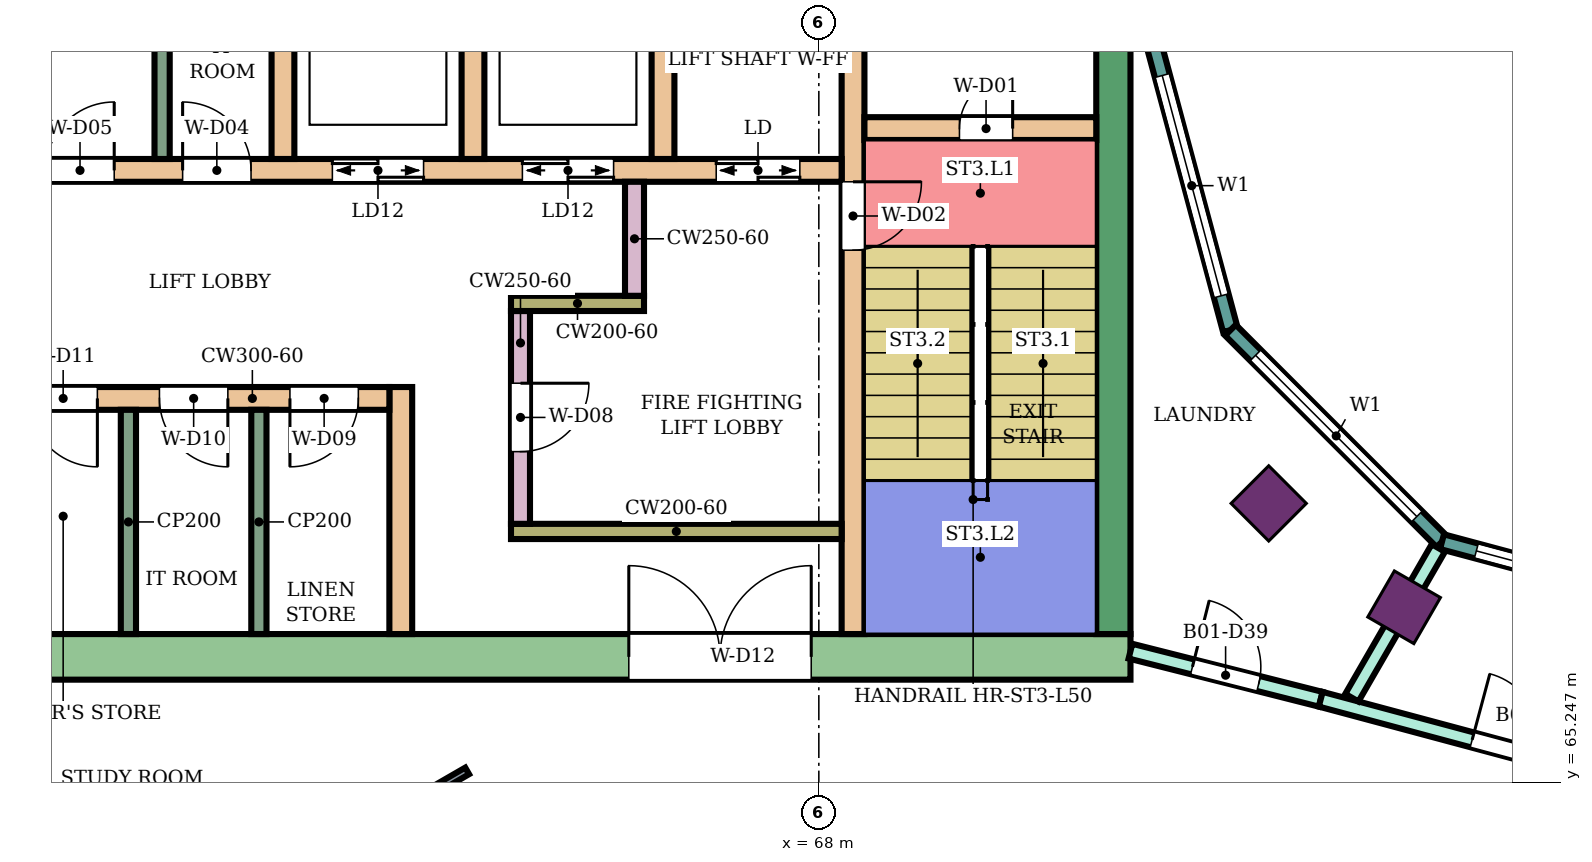
"""IFC4 building model, lengths in metres.
Left out: names, types, materials, properties, quantities, classifications, styles, units other than length and angle.
Written with IfcOpenShell. Run it as: python <this file> out.ifc"""

import sys

from ifc_helpers import new_model, si_unit, direction, frame, frame_2d, origin, origin_2d, place, context, subcontext, project, spatial, rectangle, extrude, element, fill, save


model = new_model("IFC4")
c1 = context("Model", 3, precision=1e-05, world=origin(), true_north=direction((0.0, 1.0)))
c2 = subcontext(c1, "Body", "Model", "MODEL_VIEW")
j1 = project(units=[si_unit("LENGTHUNIT", "METRE"), si_unit("PLANEANGLEUNIT", "RADIAN")], contexts=[c1])
p1 = place(None, origin())
s1 = spatial("IfcSite", under=j1, at=p1, CompositionType="ELEMENT")
p2 = place(p1, origin())
s2 = spatial("IfcBuilding", under=s1, at=p2, CompositionType="ELEMENT")
p3 = place(p2, frame((0.0, 0.0, 216.7)))
s3 = spatial("IfcBuildingStorey", under=s2, at=p3, CompositionType="ELEMENT", Elevation=216.7)
for number, where, z_axis, x_axis in (
    (1, (73.919, 68.919, 0.0), (0.0, 0.0, 1.0), (-0.707, -0.707, 0.0)),
    (2, (75.7, 67.552, 0.0), (0.0, 0.0, 1.0), (-0.5, -0.866, 0.0)),
):
    element("IfcColumn", number, at=place(p3, frame(where, z_axis=z_axis, x_axis=x_axis)), inside=s3, PredefinedType="COLUMN", context=c2, shape_type="SweptSolid", body=[
        extrude(rectangle(XDim=0.7, YDim=0.7, at=origin_2d()), origin(), (0.0, 0.0, 1.0), 4.2),
    ])
p4 = place(p3, frame((72.1, 66.9, 0.0), z_axis=(0.0, 0.0, 1.0), x_axis=(-1.0, 0.0, 0.0)))
e3 = element("IfcWall", 3, at=p4, inside=s3, PredefinedType="SHEAR", context=c2, shape_type="SweptSolid", body=[
    extrude(rectangle(XDim=14.9, YDim=0.6, at=frame_2d((7.45, 0.0))), origin(), (0.0, 0.0, 1.0), 3.88),
])
p5 = place(p4, frame((4.2, 0.0, 0.0)))
e4 = element("IfcOpeningElement", 4, at=p5, cuts=e3, PredefinedType="OPENING", context=c2, shape_type="SweptSolid", body=[
    extrude(rectangle(XDim=2.4, YDim=2.4, at=frame_2d((1.2, 1.2))), frame((0.0, 0.31, 0.0), z_axis=(0.0, -1.0, 0.0), x_axis=(1.0, 0.0, 0.0)), (0.0, 0.0, 1.0), 0.62),
])
p6 = place(p3, frame((71.875, 75.0, 0.0), z_axis=(0.0, 0.0, 1.0), x_axis=(0.0, -1.0, 0.0)))
e5 = element("IfcWall", 5, at=p6, inside=s3, PredefinedType="SHEAR", context=c2, shape_type="SweptSolid", body=[
    extrude(rectangle(XDim=7.8, YDim=0.45, at=frame_2d((3.9, 0.0))), origin(), (0.0, 0.0, 1.0), 3.88),
])
p7 = place(p3, frame((68.45, 75.0, 0.0), z_axis=(0.0, 0.0, 1.0), x_axis=(0.0, -1.0, 0.0)))
e6 = element("IfcWall", 6, at=p7, inside=s3, PredefinedType="SHEAR", context=c2, shape_type="SweptSolid", body=[
    extrude(rectangle(XDim=7.8, YDim=0.3, at=frame_2d((3.9, 0.0))), origin(), (0.0, 0.0, 1.0), 3.88),
])
p8 = place(p7, frame((1.85, 0.0, 0.0)))
e7 = element("IfcOpeningElement", 7, at=p8, cuts=e6, PredefinedType="OPENING", context=c2, shape_type="SweptSolid", body=[
    extrude(rectangle(XDim=0.9, YDim=2.1, at=frame_2d((0.45, 1.05))), frame((0.0, 0.16, 0.0), z_axis=(0.0, -1.0, 0.0), x_axis=(1.0, 0.0, 0.0)), (0.0, 0.0, 1.0), 0.32),
])
p9 = place(p3, frame((71.65, 73.85, 0.0), z_axis=(0.0, 0.0, 1.0), x_axis=(-1.0, 0.0, 0.0)))
e8 = element("IfcWall", 8, at=p9, inside=s3, PredefinedType="SHEAR", context=c2, shape_type="SweptSolid", body=[
    extrude(rectangle(XDim=3.05, YDim=0.3, at=frame_2d((1.525, 0.0))), origin(), (0.0, 0.0, 1.0), 3.88),
])
p10 = place(p9, frame((1.1, 0.0, 0.0)))
e9 = element("IfcOpeningElement", 9, at=p10, cuts=e8, PredefinedType="OPENING", context=c2, shape_type="SweptSolid", body=[
    extrude(rectangle(XDim=0.7, YDim=2.0, at=frame_2d((0.35, 1.0))), frame((0.0, 0.16, 0.0), z_axis=(0.0, -1.0, 0.0), x_axis=(1.0, 0.0, 0.0)), (0.0, 0.0, 1.0), 0.32),
])
p11 = place(p3, frame((68.3, 73.3, 0.0), z_axis=(0.0, 0.0, 1.0), x_axis=(-1.0, 0.0, 0.0)))
e10 = element("IfcWall", 10, at=p11, inside=s3, PredefinedType="SHEAR", context=c2, shape_type="SweptSolid", body=[
    extrude(rectangle(XDim=11.1, YDim=0.3, at=frame_2d((5.55, 0.0))), origin(), (0.0, 0.0, 1.0), 3.88),
])
p12 = place(p11, frame((0.55, 0.0, 0.0)))
e11 = element("IfcOpeningElement", 11, at=p12, cuts=e10, PredefinedType="OPENING", context=c2, shape_type="SweptSolid", body=[
    extrude(rectangle(XDim=1.1, YDim=2.1, at=frame_2d((0.55, 1.05))), frame((0.0, 0.16, 0.0), z_axis=(0.0, -1.0, 0.0), x_axis=(1.0, 0.0, 0.0)), (0.0, 0.0, 1.0), 0.32),
])
p13 = place(p11, frame((3.0, 0.0, 0.0)))
e12 = element("IfcOpeningElement", 12, at=p13, cuts=e10, PredefinedType="OPENING", context=c2, shape_type="SweptSolid", body=[
    extrude(rectangle(XDim=1.2, YDim=2.1, at=frame_2d((0.6, 1.05))), frame((0.0, 0.16, 0.0), z_axis=(0.0, -1.0, 0.0), x_axis=(1.0, 0.0, 0.0)), (0.0, 0.0, 1.0), 0.32),
])
p14 = place(p11, frame((5.5, 0.0, 0.0)))
e13 = element("IfcOpeningElement", 13, at=p14, cuts=e10, PredefinedType="OPENING", context=c2, shape_type="SweptSolid", body=[
    extrude(rectangle(XDim=1.2, YDim=2.1, at=frame_2d((0.6, 1.05))), frame((0.0, 0.16, 0.0), z_axis=(0.0, -1.0, 0.0), x_axis=(1.0, 0.0, 0.0)), (0.0, 0.0, 1.0), 0.32),
])
p15 = place(p11, frame((7.77, 0.0, 0.0)))
e14 = element("IfcOpeningElement", 14, at=p15, cuts=e10, PredefinedType="OPENING", context=c2, shape_type="SweptSolid", body=[
    extrude(rectangle(XDim=0.9, YDim=2.1, at=frame_2d((0.45, 1.05))), frame((0.0, 0.16, 0.0), z_axis=(0.0, -1.0, 0.0), x_axis=(1.0, 0.0, 0.0)), (0.0, 0.0, 1.0), 0.32),
])
p16 = place(p11, frame((9.57, 0.0, 0.0)))
e15 = element("IfcOpeningElement", 15, at=p16, cuts=e10, PredefinedType="OPENING", context=c2, shape_type="SweptSolid", body=[
    extrude(rectangle(XDim=0.9, YDim=2.1, at=frame_2d((0.45, 1.05))), frame((0.0, 0.16, 0.0), z_axis=(0.0, -1.0, 0.0), x_axis=(1.0, 0.0, 0.0)), (0.0, 0.0, 1.0), 0.32),
])
for number, where, z_axis, x_axis in (
    (16, (65.95, 76.0, 0.0), (0.0, 0.0, 1.0), (0.0, -1.0, 0.0)),
    (17, (63.45, 76.0, 0.0), (0.0, 0.0, 1.0), (0.0, -1.0, 0.0)),
    (18, (60.95, 76.0, 0.0), (0.0, 0.0, 1.0), (0.0, -1.0, 0.0)),
):
    element("IfcWall", number, at=place(p3, frame(where, z_axis=z_axis, x_axis=x_axis)), inside=s3, PredefinedType="SHEAR", context=c2, shape_type="SweptSolid", body=[
        extrude(rectangle(XDim=2.55, YDim=0.3, at=frame_2d((1.275, 0.0))), origin(), (0.0, 0.0, 1.0), 3.88),
    ])
p17 = place(p3, frame((68.3, 68.55, 0.0), z_axis=(0.0, 0.0, 1.0), x_axis=(-1.0, 0.0, 0.0)))
e19 = element("IfcWall", 19, at=p17, inside=s3, PredefinedType="SHEAR", context=c2, shape_type="SweptSolid", body=[
    extrude(rectangle(XDim=4.35, YDim=0.2, at=frame_2d((2.175, 0.0))), origin(), (0.0, 0.0, 1.0), 3.88),
])
p18 = place(p3, frame((64.075, 71.45, 0.0), z_axis=(0.0, 0.0, 1.0), x_axis=(0.0, -1.0, 0.0)))
e20 = element("IfcWall", 20, at=p18, inside=s3, PredefinedType="SHEAR", context=c2, shape_type="SweptSolid", body=[
    extrude(rectangle(XDim=2.8, YDim=0.25, at=frame_2d((1.4, 0.0))), origin(), (0.0, 0.0, 1.0), 3.88),
])
p19 = place(p18, frame((0.95, 0.0, 0.0)))
e21 = element("IfcOpeningElement", 21, at=p19, cuts=e20, PredefinedType="OPENING", context=c2, shape_type="SweptSolid", body=[
    extrude(rectangle(XDim=0.9, YDim=2.1, at=frame_2d((0.45, 1.05))), frame((0.0, 0.135, 0.0), z_axis=(0.0, -1.0, 0.0), x_axis=(1.0, 0.0, 0.0)), (0.0, 0.0, 1.0), 0.27),
])
p20 = place(p3, frame((65.7, 71.55, 0.0), z_axis=(0.0, 0.0, 1.0), x_axis=(-1.0, 0.0, 0.0)))
e22 = element("IfcWall", 22, at=p20, inside=s3, PredefinedType="SHEAR", context=c2, shape_type="SweptSolid", body=[
    extrude(rectangle(XDim=1.75, YDim=0.2, at=frame_2d((0.875, 0.0))), origin(), (0.0, 0.0, 1.0), 3.88),
])
p21 = place(p3, frame((65.575, 73.15, 0.0), z_axis=(0.0, 0.0, 1.0), x_axis=(0.0, -1.0, 0.0)))
e23 = element("IfcWall", 23, at=p21, inside=s3, PredefinedType="SHEAR", context=c2, shape_type="SweptSolid", body=[
    extrude(rectangle(XDim=1.5, YDim=0.25, at=frame_2d((0.75, 0.0))), origin(), (0.0, 0.0, 1.0), 3.88),
])
p22 = place(p3, frame((62.5, 70.45, 0.0), z_axis=(0.0, 0.0, 1.0), x_axis=(0.0, -1.0, 0.0)))
e24 = element("IfcWall", 24, at=p22, inside=s3, PredefinedType="SHEAR", context=c2, shape_type="SweptSolid", body=[
    extrude(rectangle(XDim=3.25, YDim=0.3, at=frame_2d((1.625, 0.0))), origin(), (0.0, 0.0, 1.0), 3.88),
])
p23 = place(p3, frame((62.35, 70.3, 0.0), z_axis=(0.0, 0.0, 1.0), x_axis=(-1.0, 0.0, 0.0)))
e25 = element("IfcWall", 25, at=p23, inside=s3, PredefinedType="SHEAR", context=c2, shape_type="SweptSolid", body=[
    extrude(rectangle(XDim=5.15, YDim=0.3, at=frame_2d((2.575, 0.0))), origin(), (0.0, 0.0, 1.0), 3.88),
])
p24 = place(p23, frame((0.408, 0.0, 0.0)))
e26 = element("IfcOpeningElement", 26, at=p24, cuts=e25, PredefinedType="OPENING", context=c2, shape_type="SweptSolid", body=[
    extrude(rectangle(XDim=0.9, YDim=2.1, at=frame_2d((0.45, 1.05))), frame((0.0, 0.16, 0.0), z_axis=(0.0, -1.0, 0.0), x_axis=(1.0, 0.0, 0.0)), (0.0, 0.0, 1.0), 0.32),
])
p25 = place(p23, frame((2.125, 0.0, 0.0)))
e27 = element("IfcOpeningElement", 27, at=p25, cuts=e25, PredefinedType="OPENING", context=c2, shape_type="SweptSolid", body=[
    extrude(rectangle(XDim=0.9, YDim=2.1, at=frame_2d((0.45, 1.05))), frame((0.0, 0.16, 0.0), z_axis=(0.0, -1.0, 0.0), x_axis=(1.0, 0.0, 0.0)), (0.0, 0.0, 1.0), 0.32),
])
p26 = place(p23, frame((3.842, 0.0, 0.0)))
e28 = element("IfcOpeningElement", 28, at=p26, cuts=e25, PredefinedType="OPENING", context=c2, shape_type="SweptSolid", body=[
    extrude(rectangle(XDim=0.9, YDim=2.1, at=frame_2d((0.45, 1.05))), frame((0.0, 0.16, 0.0), z_axis=(0.0, -1.0, 0.0), x_axis=(1.0, 0.0, 0.0)), (0.0, 0.0, 1.0), 0.32),
])
p27 = place(p3, frame((72.396, 75.0, 0.0), z_axis=(0.0, 0.0, 1.0), x_axis=(0.258789828301, -0.965933654434, 0.0)))
e29 = element("IfcWall", 29, at=p27, inside=s3, PredefinedType="NOTDEFINED", context=c2, shape_type="SweptSolid", body=[
    extrude(rectangle(XDim=3.936, YDim=0.2, at=frame_2d((1.968, 0.0))), origin(), (0.0, 0.0, 1.0), 4.2),
])
p28 = place(p27, frame((0.468, 0.0, 0.9)))
e30 = element("IfcOpeningElement", 30, at=p28, cuts=e29, PredefinedType="OPENING", context=c2, shape_type="SweptSolid", body=[
    extrude(rectangle(XDim=3.0, YDim=2.3, at=frame_2d((1.5, 1.15))), frame((0.0, 0.11, 0.0), z_axis=(0.0, -1.0, 0.0), x_axis=(1.0, 0.0, 0.0)), (0.0, 0.0, 1.0), 0.22),
])
p29 = place(p3, frame((73.415, 71.198, 0.0), z_axis=(0.0, 0.0, 1.0), x_axis=(0.707106781187, -0.707106781187, 0.0)))
e31 = element("IfcWall", 31, at=p29, inside=s3, PredefinedType="NOTDEFINED", context=c2, shape_type="SweptSolid", body=[
    extrude(rectangle(XDim=3.936, YDim=0.2, at=frame_2d((1.968, 0.0))), origin(), (0.0, 0.0, 1.0), 4.2),
])
p30 = place(p29, frame((0.468, 0.0, 0.9)))
e32 = element("IfcOpeningElement", 32, at=p30, cuts=e31, PredefinedType="OPENING", context=c2, shape_type="SweptSolid", body=[
    extrude(rectangle(XDim=3.0, YDim=2.3, at=frame_2d((1.5, 1.15))), frame((0.0, 0.11, 0.0), z_axis=(0.0, -1.0, 0.0), x_axis=(1.0, 0.0, 0.0)), (0.0, 0.0, 1.0), 0.22),
])
p31 = place(p3, frame((76.198, 68.415, 0.0), z_axis=(0.0, 0.0, 1.0), x_axis=(0.965933654434, -0.258789828301, 0.0)))
e33 = element("IfcWall", 33, at=p31, inside=s3, PredefinedType="NOTDEFINED", context=c2, shape_type="SweptSolid", body=[
    extrude(rectangle(XDim=3.936, YDim=0.2, at=frame_2d((1.968, 0.0))), origin(), (0.0, 0.0, 1.0), 4.2),
])
p32 = place(p31, frame((0.468, 0.0, 0.9)))
e34 = element("IfcOpeningElement", 34, at=p32, cuts=e33, PredefinedType="OPENING", context=c2, shape_type="SweptSolid", body=[
    extrude(rectangle(XDim=3.0, YDim=2.3, at=frame_2d((1.5, 1.15))), frame((0.0, 0.11, 0.0), z_axis=(0.0, -1.0, 0.0), x_axis=(1.0, 0.0, 0.0)), (0.0, 0.0, 1.0), 0.22),
])
p33 = place(p3, frame((72.1, 66.975, 0.0), z_axis=(0.0, 0.0, 1.0), x_axis=(0.969471314457, -0.245204752086, 0.0)))
e35 = element("IfcWall", 35, at=p33, inside=s3, PredefinedType="PARTITIONING", context=c2, shape_type="SweptSolid", body=[
    extrude(rectangle(XDim=2.582, YDim=0.2, at=frame_2d((1.291, 0.0))), origin(), (0.0, 0.0, 1.0), 3.75),
])
p34 = place(p33, frame((0.841, 0.0, 0.0)))
e36 = element("IfcOpeningElement", 36, at=p34, cuts=e35, PredefinedType="OPENING", context=c2, shape_type="SweptSolid", body=[
    extrude(rectangle(XDim=0.9, YDim=2.1, at=frame_2d((0.45, 1.05))), frame((0.0, 0.11, 0.0), z_axis=(0.0, -1.0, 0.0), x_axis=(1.0, 0.0, 0.0)), (0.0, 0.0, 1.0), 0.22),
])
p35 = place(p3, frame((74.603, 66.342, 0.0), z_axis=(0.0, 0.0, 1.0), x_axis=(0.965895298152, -0.258932950796, 0.0)))
e37 = element("IfcWall", 37, at=p35, inside=s3, PredefinedType="PARTITIONING", context=c2, shape_type="SweptSolid", body=[
    extrude(rectangle(XDim=5.538, YDim=0.2, at=frame_2d((2.769, 0.0))), origin(), (0.0, 0.0, 1.0), 3.75),
])
p36 = place(p35, frame((2.062, 0.0, 0.0)))
e38 = element("IfcOpeningElement", 38, at=p36, cuts=e37, PredefinedType="OPENING", context=c2, shape_type="SweptSolid", body=[
    extrude(rectangle(XDim=1.8, YDim=2.1, at=frame_2d((0.9, 1.05))), frame((0.0, 0.11, 0.0), z_axis=(0.0, -1.0, 0.0), x_axis=(1.0, 0.0, 0.0)), (0.0, 0.0, 1.0), 0.22),
])
p37 = place(p3, frame((75.013, 66.363, 0.0), z_axis=(0.0, 0.0, 1.0), x_axis=(0.500121996664, 0.86595495752, 0.0)))
e39 = element("IfcWall", 39, at=p37, inside=s3, PredefinedType="PARTITIONING", context=c2, shape_type="SweptSolid", body=[
    extrude(rectangle(XDim=2.274, YDim=0.2, at=frame_2d((1.137, 0.0))), origin(), (0.0, 0.0, 1.0), 3.75),
])
p38 = place(p3, frame((57.658, 62.102, 0.0), z_axis=(0.0, 0.0, 1.0), x_axis=(0.866131372301, 0.499816412211, 0.0)))
e40 = element("IfcWall", 40, at=p38, inside=s3, PredefinedType="PARTITIONING", context=c2, shape_type="SweptSolid", body=[
    extrude(rectangle(XDim=6.598, YDim=0.1, at=frame_2d((3.299, 0.0))), origin(), (0.0, 0.0, 1.0), 3.75),
])
p39 = place(p38, frame((1.77, 0.0, 0.0)))
e41 = element("IfcOpeningElement", 41, at=p39, cuts=e40, PredefinedType="OPENING", context=c2, shape_type="SweptSolid", body=[
    extrude(rectangle(XDim=0.9, YDim=2.1, at=frame_2d((0.45, 1.05))), frame((0.0, 0.06, 0.0), z_axis=(0.0, -1.0, 0.0), x_axis=(1.0, 0.0, 0.0)), (0.0, 0.0, 1.0), 0.12),
])
p40 = place(p3, frame((59.36, 76.0, 0.0), z_axis=(0.0, 0.0, 1.0), x_axis=(0.0, -1.0, 0.0)))
e42 = element("IfcWall", 42, at=p40, inside=s3, PredefinedType="PARTITIONING", context=c2, shape_type="SweptSolid", body=[
    extrude(rectangle(XDim=2.55, YDim=0.2, at=frame_2d((1.275, 0.0))), origin(), (0.0, 0.0, 1.0), 3.88),
])
for number, where, z_axis, x_axis in (
    (43, (60.633, 70.15, 0.0), (0.0, 0.0, 1.0), (0.0, -1.0, 0.0)),
    (44, (58.917, 70.15, 0.0), (0.0, 0.0, 1.0), (0.0, -1.0, 0.0)),
):
    element("IfcWall", number, at=place(p3, frame(where, z_axis=z_axis, x_axis=x_axis)), inside=s3, PredefinedType="PARTITIONING", context=c2, shape_type="SweptSolid", body=[
        extrude(rectangle(XDim=2.95, YDim=0.2, at=frame_2d((1.475, 0.0))), origin(), (0.0, 0.0, 1.0), 3.88),
    ])
p41 = place(p28, origin())
e45 = element("IfcWindow", 45, at=p41, inside=s3, PartitioningType="SINGLE_PANEL", PredefinedType="WINDOW", context=c2, shape_type="SweptSolid", body=[
    extrude(rectangle(XDim=3.0, YDim=2.3, at=frame_2d((1.5, 1.15))), frame((0.0, 0.03, 0.0), z_axis=(0.0, -1.0, 0.0), x_axis=(1.0, 0.0, 0.0)), (0.0, 0.0, 1.0), 0.06),
])
fill(e30, e45)
p42 = place(p30, origin())
e46 = element("IfcWindow", 46, at=p42, inside=s3, PartitioningType="SINGLE_PANEL", PredefinedType="WINDOW", context=c2, shape_type="SweptSolid", body=[
    extrude(rectangle(XDim=3.0, YDim=2.3, at=frame_2d((1.5, 1.15))), frame((0.0, 0.03, 0.0), z_axis=(0.0, -1.0, 0.0), x_axis=(1.0, 0.0, 0.0)), (0.0, 0.0, 1.0), 0.06),
])
fill(e32, e46)
p43 = place(p32, origin())
e47 = element("IfcWindow", 47, at=p43, inside=s3, PartitioningType="SINGLE_PANEL", PredefinedType="WINDOW", context=c2, shape_type="SweptSolid", body=[
    extrude(rectangle(XDim=3.0, YDim=2.3, at=frame_2d((1.5, 1.15))), frame((0.0, 0.03, 0.0), z_axis=(0.0, -1.0, 0.0), x_axis=(1.0, 0.0, 0.0)), (0.0, 0.0, 1.0), 0.06),
])
fill(e34, e47)
p44 = place(p36, origin())
e48 = element("IfcDoor", 48, at=p44, inside=s3, OperationType="DOUBLE_DOOR_SINGLE_SWING", PredefinedType="DOOR", context=c2, shape_type="SweptSolid", body=[
    extrude(rectangle(XDim=1.8, YDim=2.1, at=frame_2d((0.9, 1.05))), frame((0.0, 0.025, 0.0), z_axis=(0.0, -1.0, 0.0), x_axis=(1.0, 0.0, 0.0)), (0.0, 0.0, 1.0), 0.05),
])
fill(e38, e48)
p45 = place(p34, origin())
e49 = element("IfcDoor", 49, at=p45, inside=s3, OperationType="SINGLE_SWING_LEFT", PredefinedType="DOOR", context=c2, shape_type="SweptSolid", body=[
    extrude(rectangle(XDim=0.9, YDim=2.1, at=frame_2d((0.45, 1.05))), frame((0.0, 0.025, 0.0), z_axis=(0.0, -1.0, 0.0), x_axis=(1.0, 0.0, 0.0)), (0.0, 0.0, 1.0), 0.05),
])
fill(e36, e49)
p46 = place(p10, frame((0.7, 0.0, 0.0), z_axis=(0.0, 0.0, 1.0), x_axis=(-1.0, 0.0, 0.0)))
e50 = element("IfcDoor", 50, at=p46, inside=s3, OperationType="SINGLE_SWING_RIGHT", PredefinedType="DOOR", context=c2, shape_type="SweptSolid", body=[
    extrude(rectangle(XDim=0.7, YDim=2.0, at=frame_2d((0.35, 1.0))), frame((0.0, 0.025, 0.0), z_axis=(0.0, -1.0, 0.0), x_axis=(1.0, 0.0, 0.0)), (0.0, 0.0, 1.0), 0.05),
])
fill(e9, e50)
p47 = place(p8, origin())
e51 = element("IfcDoor", 51, at=p47, inside=s3, OperationType="SINGLE_SWING_LEFT", PredefinedType="DOOR", context=c2, shape_type="SweptSolid", body=[
    extrude(rectangle(XDim=0.9, YDim=2.1, at=frame_2d((0.45, 1.05))), frame((0.0, 0.025, 0.0), z_axis=(0.0, -1.0, 0.0), x_axis=(1.0, 0.0, 0.0)), (0.0, 0.0, 1.0), 0.05),
])
fill(e7, e51)
p48 = place(p12, origin())
e52 = element("IfcDoor", 52, at=p48, inside=s3, OperationType="DOUBLE_DOOR_SLIDING", PredefinedType="DOOR", context=c2, shape_type="SweptSolid", body=[
    extrude(rectangle(XDim=1.1, YDim=2.1, at=frame_2d((0.55, 1.05))), frame((0.0, 0.025, 0.0), z_axis=(0.0, -1.0, 0.0), x_axis=(1.0, 0.0, 0.0)), (0.0, 0.0, 1.0), 0.05),
])
fill(e11, e52)
p49 = place(p13, origin())
e53 = element("IfcDoor", 53, at=p49, inside=s3, OperationType="DOUBLE_DOOR_SLIDING", PredefinedType="DOOR", context=c2, shape_type="SweptSolid", body=[
    extrude(rectangle(XDim=1.2, YDim=2.1, at=frame_2d((0.6, 1.05))), frame((0.0, 0.025, 0.0), z_axis=(0.0, -1.0, 0.0), x_axis=(1.0, 0.0, 0.0)), (0.0, 0.0, 1.0), 0.05),
])
fill(e12, e53)
p50 = place(p14, origin())
e54 = element("IfcDoor", 54, at=p50, inside=s3, OperationType="DOUBLE_DOOR_SLIDING", PredefinedType="DOOR", context=c2, shape_type="SweptSolid", body=[
    extrude(rectangle(XDim=1.2, YDim=2.1, at=frame_2d((0.6, 1.05))), frame((0.0, 0.025, 0.0), z_axis=(0.0, -1.0, 0.0), x_axis=(1.0, 0.0, 0.0)), (0.0, 0.0, 1.0), 0.05),
])
fill(e13, e54)
p51 = place(p15, frame((0.9, 0.0, 0.0), z_axis=(0.0, 0.0, 1.0), x_axis=(-1.0, 0.0, 0.0)))
e55 = element("IfcDoor", 55, at=p51, inside=s3, OperationType="SINGLE_SWING_LEFT", PredefinedType="DOOR", context=c2, shape_type="SweptSolid", body=[
    extrude(rectangle(XDim=0.9, YDim=2.1, at=frame_2d((0.45, 1.05))), frame((0.0, 0.025, 0.0), z_axis=(0.0, -1.0, 0.0), x_axis=(1.0, 0.0, 0.0)), (0.0, 0.0, 1.0), 0.05),
])
fill(e14, e55)
p52 = place(p16, frame((0.9, 0.0, 0.0), z_axis=(0.0, 0.0, 1.0), x_axis=(-1.0, 0.0, 0.0)))
e56 = element("IfcDoor", 56, at=p52, inside=s3, OperationType="SINGLE_SWING_RIGHT", PredefinedType="DOOR", context=c2, shape_type="SweptSolid", body=[
    extrude(rectangle(XDim=0.9, YDim=2.1, at=frame_2d((0.45, 1.05))), frame((0.0, 0.025, 0.0), z_axis=(0.0, -1.0, 0.0), x_axis=(1.0, 0.0, 0.0)), (0.0, 0.0, 1.0), 0.05),
])
fill(e15, e56)
p53 = place(p19, origin())
e57 = element("IfcDoor", 57, at=p53, inside=s3, OperationType="SINGLE_SWING_LEFT", PredefinedType="DOOR", context=c2, shape_type="SweptSolid", body=[
    extrude(rectangle(XDim=0.9, YDim=2.1, at=frame_2d((0.45, 1.05))), frame((0.0, 0.025, 0.0), z_axis=(0.0, -1.0, 0.0), x_axis=(1.0, 0.0, 0.0)), (0.0, 0.0, 1.0), 0.05),
])
fill(e21, e57)
p54 = place(p24, origin())
e58 = element("IfcDoor", 58, at=p54, inside=s3, OperationType="SINGLE_SWING_RIGHT", PredefinedType="DOOR", context=c2, shape_type="SweptSolid", body=[
    extrude(rectangle(XDim=0.9, YDim=2.1, at=frame_2d((0.45, 1.05))), frame((0.0, 0.025, 0.0), z_axis=(0.0, -1.0, 0.0), x_axis=(1.0, 0.0, 0.0)), (0.0, 0.0, 1.0), 0.05),
])
fill(e26, e58)
p55 = place(p25, origin())
e59 = element("IfcDoor", 59, at=p55, inside=s3, OperationType="SINGLE_SWING_LEFT", PredefinedType="DOOR", context=c2, shape_type="SweptSolid", body=[
    extrude(rectangle(XDim=0.9, YDim=2.1, at=frame_2d((0.45, 1.05))), frame((0.0, 0.025, 0.0), z_axis=(0.0, -1.0, 0.0), x_axis=(1.0, 0.0, 0.0)), (0.0, 0.0, 1.0), 0.05),
])
fill(e27, e59)
p56 = place(p26, origin())
e60 = element("IfcDoor", 60, at=p56, inside=s3, OperationType="SINGLE_SWING_LEFT", PredefinedType="DOOR", context=c2, shape_type="SweptSolid", body=[
    extrude(rectangle(XDim=0.9, YDim=2.1, at=frame_2d((0.45, 1.05))), frame((0.0, 0.025, 0.0), z_axis=(0.0, -1.0, 0.0), x_axis=(1.0, 0.0, 0.0)), (0.0, 0.0, 1.0), 0.05),
])
fill(e28, e60)
p57 = place(p5, frame((2.4, 0.0, 0.0), z_axis=(0.0, 0.0, 1.0), x_axis=(-1.0, 0.0, 0.0)))
e61 = element("IfcDoor", 61, at=p57, inside=s3, OperationType="DOUBLE_DOOR_SINGLE_SWING", PredefinedType="DOOR", context=c2, shape_type="SweptSolid", body=[
    extrude(rectangle(XDim=2.4, YDim=2.4, at=frame_2d((1.2, 1.2))), frame((0.0, 0.025, 0.0), z_axis=(0.0, -1.0, 0.0), x_axis=(1.0, 0.0, 0.0)), (0.0, 0.0, 1.0), 0.05),
])
fill(e4, e61)
save(model, sys.argv[1])
